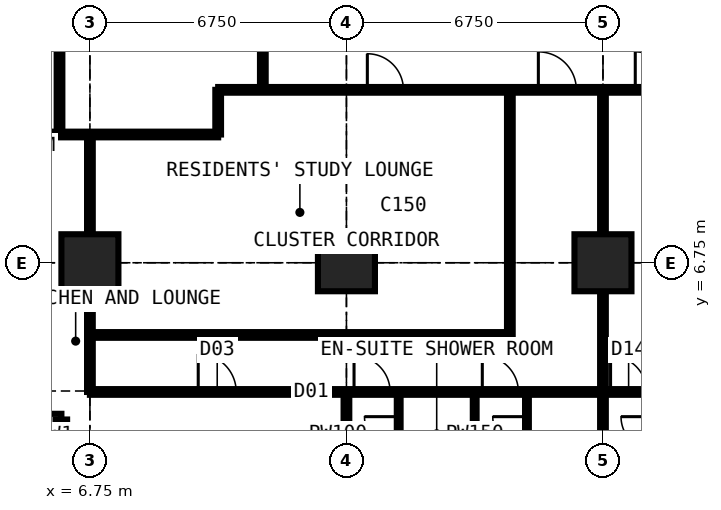
"""IFC4 building model, lengths in metres.
Left out: names, types, materials, properties, quantities, classifications, styles, units other than length and angle.
Written with IfcOpenShell. Run it as: python <this file> out.ifc"""

import sys

from ifc_helpers import new_model, si_unit, direction, frame, frame_2d, origin, origin_2d, place, context, subcontext, project, spatial, rectangle, extrude, element, fill, save


model = new_model("IFC4")
c1 = context("Model", 3, precision=1e-05, world=origin(), true_north=direction((0.0, 1.0)))
c2 = subcontext(c1, "Body", "Model", "MODEL_VIEW")
j1 = project(units=[si_unit("LENGTHUNIT", "METRE"), si_unit("PLANEANGLEUNIT", "RADIAN")], contexts=[c1])
p1 = place(None, origin())
s1 = spatial("IfcSite", under=j1, at=p1, CompositionType="ELEMENT")
p2 = place(p1, origin())
s2 = spatial("IfcBuilding", under=s1, at=p2, CompositionType="ELEMENT")
p3 = place(p2, frame((0.0, 0.0, 163.8)))
s3 = spatial("IfcBuildingStorey", under=s2, at=p3, CompositionType="ELEMENT", Elevation=163.8)
for number, where, z_axis, x_axis in (
    (1, (6.75, 6.75, 0.0), (0.0, 0.0, 1.0), (1.0, 0.0, 0.0)),
    (2, (13.5, 6.75, 0.0), (0.0, 0.0, 1.0), (1.0, 0.0, 0.0)),
    (3, (20.25, 6.75, 0.0), (0.0, 0.0, 1.0), (1.0, 0.0, 0.0)),
):
    element("IfcColumn", number, at=place(p3, frame(where, z_axis=z_axis, x_axis=x_axis)), inside=s3, PredefinedType="COLUMN", context=c2, shape_type="SweptSolid", body=[
        extrude(rectangle(XDim=1.5, YDim=1.5, at=origin_2d()), origin(), (0.0, 0.0, 1.0), 3.6),
    ])
p4 = place(p3, frame((2.625, 2.625, 0.0), z_axis=(0.0, 0.0, 1.0), x_axis=(1.0, 0.0, 0.0)))
e4 = element("IfcWall", 4, at=p4, inside=s3, PredefinedType="SOLIDWALL", context=c2, shape_type="SweptSolid", body=[
    extrude(rectangle(XDim=3.375, YDim=0.3, at=frame_2d((1.688, 0.0))), origin(), (0.0, 0.0, 1.0), 3.375),
])
p5 = place(p4, frame((0.788, 0.0, 0.6)))
e5 = element("IfcOpeningElement", 5, at=p5, cuts=e4, PredefinedType="OPENING", context=c2, shape_type="SweptSolid", body=[
    extrude(rectangle(XDim=1.8, YDim=2.1, at=frame_2d((0.9, 1.05))), frame((0.0, 0.16, 0.0), z_axis=(0.0, -1.0, 0.0), x_axis=(1.0, 0.0, 0.0)), (0.0, 0.0, 1.0), 0.32),
])
p6 = place(p3, frame((6.0, 2.625, 0.0), z_axis=(0.0, 0.0, 1.0), x_axis=(0.0, -1.0, 0.0)))
e6 = element("IfcWall", 6, at=p6, inside=s3, PredefinedType="SOLIDWALL", context=c2, shape_type="SweptSolid", body=[
    extrude(rectangle(XDim=3.375, YDim=0.3, at=frame_2d((1.688, 0.0))), origin(), (0.0, 0.0, 1.0), 3.375),
])
p7 = place(p6, frame((0.268, 0.0, 0.9)))
e7 = element("IfcOpeningElement", 7, at=p7, cuts=e6, PredefinedType="OPENING", context=c2, shape_type="SweptSolid", body=[
    extrude(rectangle(XDim=1.5, YDim=1.8, at=frame_2d((0.75, 0.9))), frame((0.0, 0.16, 0.0), z_axis=(0.0, -1.0, 0.0), x_axis=(1.0, 0.0, 0.0)), (0.0, 0.0, 1.0), 0.32),
])
p8 = place(p3, frame((-0.734, 10.125, 0.0), z_axis=(0.0, 0.0, 1.0), x_axis=(1.0, 0.0, 0.0)))
e8 = element("IfcWall", 8, at=p8, inside=s3, PredefinedType="PARTITIONING", context=c2, shape_type="SweptSolid", body=[
    extrude(rectangle(XDim=10.859, YDim=0.15, at=frame_2d((5.429, 0.0))), origin(), (0.0, 0.0, 1.0), 3.375),
])
p9 = place(p3, frame((5.95, 10.125, 0.0), z_axis=(0.0, 0.0, 1.0), x_axis=(0.0, 1.0, 0.0)))
e9 = element("IfcWall", 9, at=p9, inside=s3, PredefinedType="PARTITIONING", context=c2, shape_type="SweptSolid", body=[
    extrude(rectangle(XDim=2.65, YDim=0.15, at=frame_2d((1.325, 0.0))), origin(), (0.0, 0.0, 1.0), 3.375),
])
p10 = place(p3, frame((6.75, 3.35, 0.0), z_axis=(0.0, 0.0, 1.0), x_axis=(0.0, 1.0, 0.0)))
e10 = element("IfcWall", 10, at=p10, inside=s3, PredefinedType="PARTITIONING", context=c2, shape_type="SweptSolid", body=[
    extrude(rectangle(XDim=6.775, YDim=0.15, at=frame_2d((3.387, 0.0))), origin(), (0.0, 0.0, 1.0), 2.877),
])
p11 = place(p3, frame((6.75, 3.35, 0.0), z_axis=(0.0, 0.0, 1.0), x_axis=(1.0, 0.0, 0.0)))
e11 = element("IfcWall", 11, at=p11, inside=s3, PredefinedType="PARTITIONING", context=c2, shape_type="SweptSolid", body=[
    extrude(rectangle(XDim=20.25, YDim=0.15, at=frame_2d((10.125, 0.0))), origin(), (0.0, 0.0, 1.0), 3.375),
])
p12 = place(p11, frame((2.85, 0.0, 0.0)))
e12 = element("IfcOpeningElement", 12, at=p12, cuts=e11, PredefinedType="OPENING", context=c2, shape_type="SweptSolid", body=[
    extrude(rectangle(XDim=1.0, YDim=2.2, at=frame_2d((0.5, 1.1))), frame((0.0, 0.085, 0.0), z_axis=(0.0, -1.0, 0.0), x_axis=(1.0, 0.0, 0.0)), (0.0, 0.0, 1.0), 0.17),
])
p13 = place(p11, frame((6.95, 0.0, 0.0)))
e13 = element("IfcOpeningElement", 13, at=p13, cuts=e11, PredefinedType="OPENING", context=c2, shape_type="SweptSolid", body=[
    extrude(rectangle(XDim=0.95, YDim=2.2, at=frame_2d((0.475, 1.1))), frame((0.0, 0.085, 0.0), z_axis=(0.0, -1.0, 0.0), x_axis=(1.0, 0.0, 0.0)), (0.0, 0.0, 1.0), 0.17),
])
p14 = place(p11, frame((10.325, 0.0, 0.0)))
e14 = element("IfcOpeningElement", 14, at=p14, cuts=e11, PredefinedType="OPENING", context=c2, shape_type="SweptSolid", body=[
    extrude(rectangle(XDim=0.95, YDim=2.2, at=frame_2d((0.475, 1.1))), frame((0.0, 0.085, 0.0), z_axis=(0.0, -1.0, 0.0), x_axis=(1.0, 0.0, 0.0)), (0.0, 0.0, 1.0), 0.17),
])
p15 = place(p11, frame((13.7, 0.0, 0.0)))
e15 = element("IfcOpeningElement", 15, at=p15, cuts=e11, PredefinedType="OPENING", context=c2, shape_type="SweptSolid", body=[
    extrude(rectangle(XDim=0.95, YDim=2.2, at=frame_2d((0.475, 1.1))), frame((0.0, 0.085, 0.0), z_axis=(0.0, -1.0, 0.0), x_axis=(1.0, 0.0, 0.0)), (0.0, 0.0, 1.0), 0.17),
])
p16 = place(p11, frame((17.075, 0.0, 0.0)))
e16 = element("IfcOpeningElement", 16, at=p16, cuts=e11, PredefinedType="OPENING", context=c2, shape_type="SweptSolid", body=[
    extrude(rectangle(XDim=0.95, YDim=2.2, at=frame_2d((0.475, 1.1))), frame((0.0, 0.085, 0.0), z_axis=(0.0, -1.0, 0.0), x_axis=(1.0, 0.0, 0.0)), (0.0, 0.0, 1.0), 0.17),
])
p17 = place(p3, frame((6.75, 4.85, 0.0), z_axis=(0.0, 0.0, 1.0), x_axis=(1.0, 0.0, 0.0)))
e17 = element("IfcWall", 17, at=p17, inside=s3, PredefinedType="PARTITIONING", context=c2, shape_type="SweptSolid", body=[
    extrude(rectangle(XDim=11.05, YDim=0.15, at=frame_2d((5.525, 0.0))), origin(), (0.0, 0.0, 1.0), 3.375),
])
p18 = place(p3, frame((10.125, 10.125, 0.0), z_axis=(0.0, 0.0, 1.0), x_axis=(0.0, 1.0, 0.0)))
e18 = element("IfcWall", 18, at=p18, inside=s3, PredefinedType="PARTITIONING", context=c2, shape_type="SweptSolid", body=[
    extrude(rectangle(XDim=1.175, YDim=0.15, at=frame_2d((0.587, 0.0))), origin(), (0.0, 0.0, 1.0), 3.375),
])
p19 = place(p3, frame((10.125, 11.3, 0.0), z_axis=(0.0, 0.0, 1.0), x_axis=(1.0, 0.0, 0.0)))
e19 = element("IfcWall", 19, at=p19, inside=s3, PredefinedType="PARTITIONING", context=c2, shape_type="SweptSolid", body=[
    extrude(rectangle(XDim=20.475, YDim=0.15, at=frame_2d((10.238, 0.0))), origin(), (0.0, 0.0, 1.0), 3.375),
])
p20 = place(p19, frame((8.425, 0.0, 0.0)))
e20 = element("IfcOpeningElement", 20, at=p20, cuts=e19, PredefinedType="OPENING", context=c2, shape_type="SweptSolid", body=[
    extrude(rectangle(XDim=1.0, YDim=2.2, at=frame_2d((0.5, 1.1))), frame((0.0, 0.085, 0.0), z_axis=(0.0, -1.0, 0.0), x_axis=(1.0, 0.0, 0.0)), (0.0, 0.0, 1.0), 0.17),
])
p21 = place(p19, frame((10.975, 0.0, 0.0)))
e21 = element("IfcOpeningElement", 21, at=p21, cuts=e19, PredefinedType="OPENING", context=c2, shape_type="SweptSolid", body=[
    extrude(rectangle(XDim=1.0, YDim=2.2, at=frame_2d((0.5, 1.1))), frame((0.0, 0.085, 0.0), z_axis=(0.0, -1.0, 0.0), x_axis=(1.0, 0.0, 0.0)), (0.0, 0.0, 1.0), 0.17),
])
p22 = place(p19, frame((3.925, 0.0, 0.0)))
e22 = element("IfcOpeningElement", 22, at=p22, cuts=e19, PredefinedType="OPENING", context=c2, shape_type="SweptSolid", body=[
    extrude(rectangle(XDim=0.95, YDim=2.2, at=frame_2d((0.475, 1.1))), frame((0.0, 0.085, 0.0), z_axis=(0.0, -1.0, 0.0), x_axis=(1.0, 0.0, 0.0)), (0.0, 0.0, 1.0), 0.17),
])
p23 = place(p3, frame((11.3, 11.3, 0.0), z_axis=(0.0, 0.0, 1.0), x_axis=(0.0, 1.0, 0.0)))
e23 = element("IfcWall", 23, at=p23, inside=s3, PredefinedType="PARTITIONING", context=c2, shape_type="SweptSolid", body=[
    extrude(rectangle(XDim=19.3, YDim=0.15, at=frame_2d((9.65, 0.0))), origin(), (0.0, 0.0, 1.0), 3.375),
])
p24 = place(p23, frame((18.1, 0.0, 0.0)))
e24 = element("IfcOpeningElement", 24, at=p24, cuts=e23, PredefinedType="OPENING", context=c2, shape_type="SweptSolid", body=[
    extrude(rectangle(XDim=1.0, YDim=2.2, at=frame_2d((0.5, 1.1))), frame((0.0, 0.085, 0.0), z_axis=(0.0, -1.0, 0.0), x_axis=(1.0, 0.0, 0.0)), (0.0, 0.0, 1.0), 0.17),
])
p25 = place(p23, frame((10.137, 0.0, 0.0)))
e25 = element("IfcOpeningElement", 25, at=p25, cuts=e23, PredefinedType="OPENING", context=c2, shape_type="SweptSolid", body=[
    extrude(rectangle(XDim=1.0, YDim=2.2, at=frame_2d((0.5, 1.1))), frame((0.0, 0.085, 0.0), z_axis=(0.0, -1.0, 0.0), x_axis=(1.0, 0.0, 0.0)), (0.0, 0.0, 1.0), 0.17),
])
p26 = place(p3, frame((13.5, -0.734, 0.0), z_axis=(0.0, 0.0, 1.0), x_axis=(0.0, 1.0, 0.0)))
e26 = element("IfcWall", 26, at=p26, inside=s3, PredefinedType="PARTITIONING", context=c2, shape_type="SweptSolid", body=[
    extrude(rectangle(XDim=4.084, YDim=0.15, at=frame_2d((2.042, 0.0))), origin(), (0.0, 0.0, 1.0), 2.877),
])
p27 = place(p3, frame((14.875, 1.15, 0.0), z_axis=(0.0, 0.0, 1.0), x_axis=(0.0, 1.0, 0.0)))
e27 = element("IfcWall", 27, at=p27, inside=s3, PredefinedType="PARTITIONING", context=c2, shape_type="SweptSolid", body=[
    extrude(rectangle(XDim=2.2, YDim=0.1, at=frame_2d((1.1, 0.0))), origin(), (0.0, 0.0, 1.0), 3.375),
])
p28 = place(p27, frame((0.65, 0.0, 0.0)))
e28 = element("IfcOpeningElement", 28, at=p28, cuts=e27, PredefinedType="OPENING", context=c2, shape_type="SweptSolid", body=[
    extrude(rectangle(XDim=0.9, YDim=2.2, at=frame_2d((0.45, 1.1))), frame((0.0, 0.06, 0.0), z_axis=(0.0, -1.0, 0.0), x_axis=(1.0, 0.0, 0.0)), (0.0, 0.0, 1.0), 0.12),
])
p29 = place(p3, frame((16.875, -0.734, 0.0), z_axis=(0.0, 0.0, 1.0), x_axis=(0.0, 1.0, 0.0)))
e29 = element("IfcWall", 29, at=p29, inside=s3, PredefinedType="PARTITIONING", context=c2, shape_type="SweptSolid", body=[
    extrude(rectangle(XDim=4.084, YDim=0.1, at=frame_2d((2.042, 0.0))), origin(), (0.0, 0.0, 1.0), 3.375),
])
p30 = place(p3, frame((17.8, 4.85, 0.0), z_axis=(0.0, 0.0, 1.0), x_axis=(0.0, 1.0, 0.0)))
e30 = element("IfcWall", 30, at=p30, inside=s3, PredefinedType="PARTITIONING", context=c2, shape_type="SweptSolid", body=[
    extrude(rectangle(XDim=6.45, YDim=0.15, at=frame_2d((3.225, 0.0))), origin(), (0.0, 0.0, 1.0), 3.375),
])
p31 = place(p3, frame((18.25, 1.15, 0.0), z_axis=(0.0, 0.0, 1.0), x_axis=(0.0, 1.0, 0.0)))
e31 = element("IfcWall", 31, at=p31, inside=s3, PredefinedType="PARTITIONING", context=c2, shape_type="SweptSolid", body=[
    extrude(rectangle(XDim=2.2, YDim=0.1, at=frame_2d((1.1, 0.0))), origin(), (0.0, 0.0, 1.0), 3.375),
])
p32 = place(p31, frame((0.65, 0.0, 0.0)))
e32 = element("IfcOpeningElement", 32, at=p32, cuts=e31, PredefinedType="OPENING", context=c2, shape_type="SweptSolid", body=[
    extrude(rectangle(XDim=0.9, YDim=2.2, at=frame_2d((0.45, 1.1))), frame((0.0, 0.06, 0.0), z_axis=(0.0, -1.0, 0.0), x_axis=(1.0, 0.0, 0.0)), (0.0, 0.0, 1.0), 0.12),
])
p33 = place(p3, frame((20.25, -0.734, 0.0), z_axis=(0.0, 0.0, 1.0), x_axis=(0.0, 1.0, 0.0)))
e33 = element("IfcWall", 33, at=p33, inside=s3, PredefinedType="PARTITIONING", context=c2, shape_type="SweptSolid", body=[
    extrude(rectangle(XDim=12.034, YDim=0.15, at=frame_2d((6.017, 0.0))), origin(), (0.0, 0.0, 1.0), 2.806),
])
p34 = place(p7, origin())
e34 = element("IfcWindow", 34, at=p34, inside=s3, PartitioningType="SINGLE_PANEL", PredefinedType="WINDOW", context=c2, shape_type="SweptSolid", body=[
    extrude(rectangle(XDim=1.5, YDim=1.8, at=frame_2d((0.75, 0.9))), frame((0.0, 0.03, 0.0), z_axis=(0.0, -1.0, 0.0), x_axis=(1.0, 0.0, 0.0)), (0.0, 0.0, 1.0), 0.06),
])
fill(e7, e34)
p35 = place(p12, origin())
e35 = element("IfcDoor", 35, at=p35, inside=s3, OperationType="SINGLE_SWING_LEFT", PredefinedType="DOOR", context=c2, shape_type="SweptSolid", body=[
    extrude(rectangle(XDim=1.0, YDim=2.2, at=frame_2d((0.5, 1.1))), frame((0.0, 0.025, 0.0), z_axis=(0.0, -1.0, 0.0), x_axis=(1.0, 0.0, 0.0)), (0.0, 0.0, 1.0), 0.05),
])
fill(e12, e35)
p36 = place(p13, origin())
e36 = element("IfcDoor", 36, at=p36, inside=s3, OperationType="SINGLE_SWING_LEFT", PredefinedType="DOOR", context=c2, shape_type="SweptSolid", body=[
    extrude(rectangle(XDim=0.95, YDim=2.2, at=frame_2d((0.475, 1.1))), frame((0.0, 0.025, 0.0), z_axis=(0.0, -1.0, 0.0), x_axis=(1.0, 0.0, 0.0)), (0.0, 0.0, 1.0), 0.05),
])
fill(e13, e36)
p37 = place(p28, origin())
e37 = element("IfcDoor", 37, at=p37, inside=s3, OperationType="SINGLE_SWING_RIGHT", PredefinedType="DOOR", context=c2, shape_type="SweptSolid", body=[
    extrude(rectangle(XDim=0.9, YDim=2.2, at=frame_2d((0.45, 1.1))), frame((0.0, 0.025, 0.0), z_axis=(0.0, -1.0, 0.0), x_axis=(1.0, 0.0, 0.0)), (0.0, 0.0, 1.0), 0.05),
])
fill(e28, e37)
p38 = place(p14, origin())
e38 = element("IfcDoor", 38, at=p38, inside=s3, OperationType="SINGLE_SWING_LEFT", PredefinedType="DOOR", context=c2, shape_type="SweptSolid", body=[
    extrude(rectangle(XDim=0.95, YDim=2.2, at=frame_2d((0.475, 1.1))), frame((0.0, 0.025, 0.0), z_axis=(0.0, -1.0, 0.0), x_axis=(1.0, 0.0, 0.0)), (0.0, 0.0, 1.0), 0.05),
])
fill(e14, e38)
p39 = place(p32, origin())
e39 = element("IfcDoor", 39, at=p39, inside=s3, OperationType="SINGLE_SWING_RIGHT", PredefinedType="DOOR", context=c2, shape_type="SweptSolid", body=[
    extrude(rectangle(XDim=0.9, YDim=2.2, at=frame_2d((0.45, 1.1))), frame((0.0, 0.025, 0.0), z_axis=(0.0, -1.0, 0.0), x_axis=(1.0, 0.0, 0.0)), (0.0, 0.0, 1.0), 0.05),
])
fill(e32, e39)
p40 = place(p20, origin())
e40 = element("IfcDoor", 40, at=p40, inside=s3, OperationType="SINGLE_SWING_LEFT", PredefinedType="DOOR", context=c2, shape_type="SweptSolid", body=[
    extrude(rectangle(XDim=1.0, YDim=2.2, at=frame_2d((0.5, 1.1))), frame((0.0, 0.025, 0.0), z_axis=(0.0, -1.0, 0.0), x_axis=(1.0, 0.0, 0.0)), (0.0, 0.0, 1.0), 0.05),
])
fill(e20, e40)
p41 = place(p15, origin())
e41 = element("IfcDoor", 41, at=p41, inside=s3, OperationType="SINGLE_SWING_LEFT", PredefinedType="DOOR", context=c2, shape_type="SweptSolid", body=[
    extrude(rectangle(XDim=0.95, YDim=2.2, at=frame_2d((0.475, 1.1))), frame((0.0, 0.025, 0.0), z_axis=(0.0, -1.0, 0.0), x_axis=(1.0, 0.0, 0.0)), (0.0, 0.0, 1.0), 0.05),
])
fill(e15, e41)
p42 = place(p21, origin())
e42 = element("IfcDoor", 42, at=p42, inside=s3, OperationType="SINGLE_SWING_LEFT", PredefinedType="DOOR", context=c2, shape_type="SweptSolid", body=[
    extrude(rectangle(XDim=1.0, YDim=2.2, at=frame_2d((0.5, 1.1))), frame((0.0, 0.025, 0.0), z_axis=(0.0, -1.0, 0.0), x_axis=(1.0, 0.0, 0.0)), (0.0, 0.0, 1.0), 0.05),
])
fill(e21, e42)
p43 = place(p22, origin())
e43 = element("IfcDoor", 43, at=p43, inside=s3, OperationType="SINGLE_SWING_LEFT", PredefinedType="DOOR", context=c2, shape_type="SweptSolid", body=[
    extrude(rectangle(XDim=0.95, YDim=2.2, at=frame_2d((0.475, 1.1))), frame((0.0, 0.025, 0.0), z_axis=(0.0, -1.0, 0.0), x_axis=(1.0, 0.0, 0.0)), (0.0, 0.0, 1.0), 0.05),
])
fill(e22, e43)
save(model, sys.argv[1])
